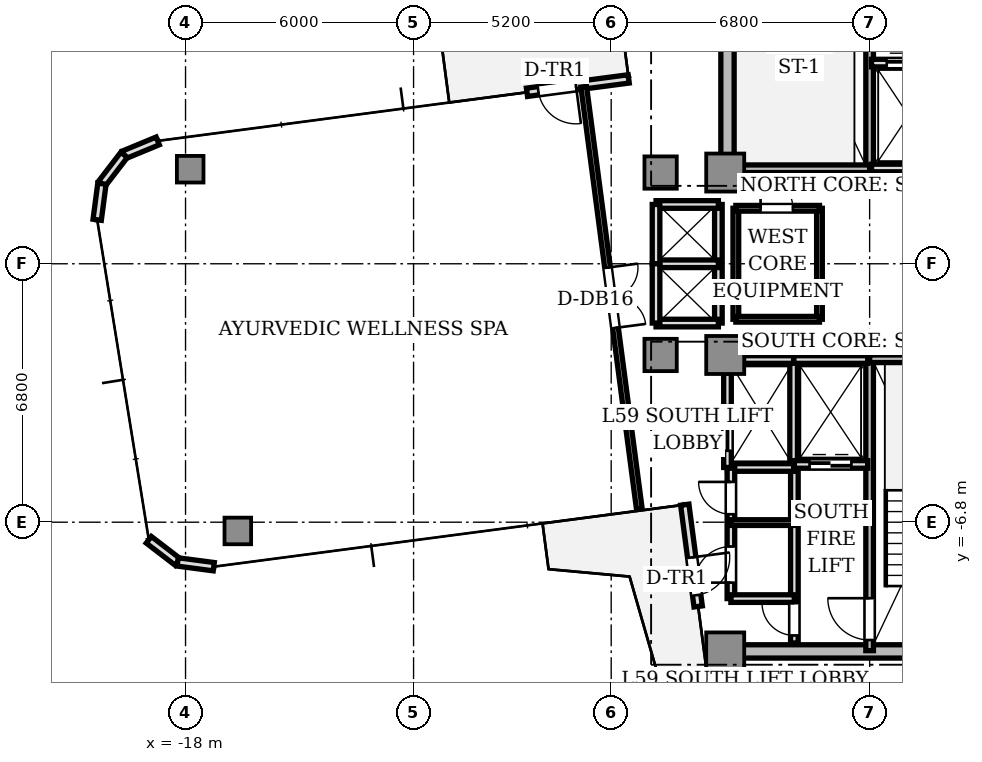
"""IFC4 building model, lengths in metres.
Left out: names, types, materials, properties, quantities, classifications, styles, units other than length and angle.
Written with IfcOpenShell. Run it as: python <this file> out.ifc"""

import sys

from ifc_helpers import new_model, si_unit, direction, frame, frame_2d, origin, origin_2d, place, context, subcontext, project, spatial, rectangle, extrude, source, transform, mapped, element, fill, save


model = new_model("IFC4")
c1 = context("Model", 3, precision=1e-05, world=origin(), true_north=direction((0.0, 1.0)))
c2 = subcontext(c1, "Body", "Model", "MODEL_VIEW")
j1 = project(units=[si_unit("LENGTHUNIT", "METRE"), si_unit("PLANEANGLEUNIT", "RADIAN")], contexts=[c1])
p1 = place(None, origin())
s1 = spatial("IfcSite", under=j1, at=p1, CompositionType="ELEMENT")
p2 = place(p1, origin())
s2 = spatial("IfcBuilding", under=s1, at=p2, CompositionType="ELEMENT")
p3 = place(p2, frame((0.0, 0.0, 213.2)))
s3 = spatial("IfcBuildingStorey", under=s2, at=p3, CompositionType="ELEMENT", Elevation=213.2)
p4 = place(p3, frame((-3.74, 2.85, 0.0), z_axis=(0.0, 0.0, 1.0), x_axis=(0.0, 1.0, 0.0)))
e1 = element("IfcWall", 1, at=p4, inside=s3, PredefinedType="SHEAR", context=c2, shape_type="SweptSolid", body=[
    extrude(rectangle(XDim=6.9, YDim=0.35, at=frame_2d((3.45, 0.0))), origin(), (0.0, 0.0, 1.0), 3.11),
])
p5 = place(p3, frame((-3.55, -10.2, 0.0), z_axis=(0.0, 0.0, 1.0), x_axis=(1.0, 0.0, 0.0)))
e2 = element("IfcWall", 2, at=p5, inside=s3, PredefinedType="SHEAR", context=c2, shape_type="SweptSolid", body=[
    extrude(rectangle(XDim=7.1, YDim=0.35, at=frame_2d((3.55, 0.0))), origin(), (0.0, 0.0, 1.0), 3.11),
])
m1 = source(origin(), c2, "Body", "SweptSolid", [
    extrude(rectangle(XDim=1.0, YDim=1.0, at=origin_2d()), origin(), (0.0, 0.0, 1.0), 3.11),
])
for number, where, z_axis, x_axis in (
    (3, (-3.8, 2.4, 0.0), (0.0, 0.0, 1.0), (1.0, 0.0, 0.0)),
    (4, (-3.8, -2.4, 0.0), (0.0, 0.0, 1.0), (1.0, 0.0, 0.0)),
    (5, (-3.8, -10.2, 0.0), (0.0, 0.0, 1.0), (1.0, 0.0, 0.0)),
):
    element("IfcColumn", number, at=place(p3, frame(where, z_axis=z_axis, x_axis=x_axis)), inside=s3, PredefinedType="COLUMN", context=c2, shape_type="MappedRepresentation", body=[
        mapped(m1, transform((0.0, 0.0, 0.0), scale=1.0)),
    ])
m2 = source(origin(), c2, "Body", "SweptSolid", [
    extrude(rectangle(XDim=0.85, YDim=0.85, at=origin_2d()), origin(), (0.0, 0.0, 1.0), 3.11),
])
for number, where, z_axis, x_axis in (
    (6, (-5.5, 2.4, 0.0), (0.0, 0.0, 1.0), (1.0, 0.0, 0.0)),
    (7, (-5.5, -2.4, 0.0), (0.0, 0.0, 1.0), (1.0, 0.0, 0.0)),
):
    element("IfcColumn", number, at=place(p3, frame(where, z_axis=z_axis, x_axis=x_axis)), inside=s3, PredefinedType="COLUMN", context=c2, shape_type="MappedRepresentation", body=[
        mapped(m2, transform((0.0, 0.0, 0.0), scale=1.0)),
    ])
m3 = source(origin(), c2, "Body", "SweptSolid", [
    extrude(rectangle(XDim=0.7, YDim=0.7, at=origin_2d()), origin(), (0.0, 0.0, 1.0), 3.11),
])
for number, where, z_axis, x_axis in (
    (8, (-17.878, 2.488, 0.0), (0.0, 0.0, 1.0), (1.0, 0.0, 0.0)),
    (9, (-16.625, -7.03, 0.0), (0.0, 0.0, 1.0), (1.0, 0.0, 0.0)),
):
    element("IfcColumn", number, at=place(p3, frame(where, z_axis=z_axis, x_axis=x_axis)), inside=s3, PredefinedType="COLUMN", context=c2, shape_type="MappedRepresentation", body=[
        mapped(m3, transform((0.0, 0.0, 0.0), scale=1.0)),
    ])
p6 = place(p3, frame((-6.339, 4.864, 0.0), z_axis=(0.0, 0.0, 1.0), x_axis=(-0.991439824936, -0.130564442062, 0.0)))
e10 = element("IfcWall", 10, at=p6, inside=s3, PredefinedType="STANDARD", context=c2, shape_type="SweptSolid", body=[
    extrude(rectangle(XDim=2.7, YDim=0.22, at=frame_2d((1.35, 0.0))), origin(), (0.0, 0.0, 1.0), 3.11),
])
p7 = place(p6, frame((1.4, 0.0, 0.0)))
e11 = element("IfcOpeningElement", 11, at=p7, cuts=e10, PredefinedType="OPENING", context=c2, shape_type="SweptSolid", body=[
    extrude(rectangle(XDim=1.0, YDim=2.2, at=frame_2d((0.5, 1.1))), frame((0.0, 0.12, 0.0), z_axis=(0.0, -1.0, 0.0), x_axis=(1.0, 0.0, 0.0)), (0.0, 0.0, 1.0), 0.24),
])
for number, where, z_axis, x_axis in (
    (12, (-18.732, 3.233, 0.0), (0.0, 0.0, 1.0), (-0.924, -0.383, 0.0)),
    (13, (-19.617, 2.866, 0.0), (0.0, 0.0, 1.0), (-0.609, -0.793, 0.0)),
    (14, (-20.2, 2.106, 0.0), (0.0, 0.0, 1.0), (-0.131, -0.991, 0.0)),
):
    element("IfcWall", number, at=place(p3, frame(where, z_axis=z_axis, x_axis=x_axis)), inside=s3, PredefinedType="STANDARD", context=c2, shape_type="SweptSolid", body=[
        extrude(rectangle(XDim=0.958, YDim=0.22, at=frame_2d((0.479, 0.0))), origin(), (0.0, 0.0, 1.0), 3.11),
    ])
p8 = place(p3, frame((-18.966, -7.263, 0.0), z_axis=(0.0, 0.0, 1.0), x_axis=(0.793249178392, -0.608897151398, 0.0)))
e15 = element("IfcWall", 15, at=p8, inside=s3, PredefinedType="STANDARD", context=c2, shape_type="SweptSolid", body=[
    extrude(rectangle(XDim=0.958, YDim=0.22, at=frame_2d((0.479, 0.0))), origin(), (0.0, 0.0, 1.0), 3.11),
])
p9 = place(p3, frame((-18.207, -7.846, 0.0), z_axis=(0.0, 0.0, 1.0), x_axis=(0.991444747987, -0.130527053476, 0.0)))
e16 = element("IfcWall", 16, at=p9, inside=s3, PredefinedType="STANDARD", context=c2, shape_type="SweptSolid", body=[
    extrude(rectangle(XDim=0.958, YDim=0.22, at=frame_2d((0.479, 0.0))), origin(), (0.0, 0.0, 1.0), 3.11),
])
p10 = place(p3, frame((-4.864, -6.339, 0.0), z_axis=(0.0, 0.0, 1.0), x_axis=(0.130564442062, -0.991439824936, 0.0)))
e17 = element("IfcWall", 17, at=p10, inside=s3, PredefinedType="STANDARD", context=c2, shape_type="SweptSolid", body=[
    extrude(rectangle(XDim=2.7, YDim=0.22, at=frame_2d((1.35, 0.0))), origin(), (0.0, 0.0, 1.0), 3.11),
])
p11 = place(p10, frame((1.4, 0.0, 0.0)))
e18 = element("IfcOpeningElement", 18, at=p11, cuts=e17, PredefinedType="OPENING", context=c2, shape_type="SweptSolid", body=[
    extrude(rectangle(XDim=1.0, YDim=2.2, at=frame_2d((0.5, 1.1))), frame((0.0, 0.12, 0.0), z_axis=(0.0, -1.0, 0.0), x_axis=(1.0, 0.0, 0.0)), (0.0, 0.0, 1.0), 0.24),
])
p12 = place(p3, frame((0.0, 2.5, 0.0), z_axis=(0.0, 0.0, 1.0), x_axis=(0.0, 1.0, 0.0)))
e19 = element("IfcWall", 19, at=p12, inside=s3, PredefinedType="SOLIDWALL", context=c2, shape_type="SweptSolid", body=[
    extrude(rectangle(XDim=7.68, YDim=0.2, at=frame_2d((3.84, 0.0))), origin(), (0.0, 0.0, 1.0), 3.11),
])
p13 = place(p12, frame((6.36, 0.0, 0.0)))
e20 = element("IfcOpeningElement", 20, at=p13, cuts=e19, PredefinedType="OPENING", context=c2, shape_type="SweptSolid", body=[
    extrude(rectangle(XDim=1.1, YDim=2.15, at=frame_2d((0.55, 1.075))), frame((0.0, 0.11, 0.0), z_axis=(0.0, -1.0, 0.0), x_axis=(1.0, 0.0, 0.0)), (0.0, 0.0, 1.0), 0.22),
])
p14 = place(p3, frame((-3.72, 2.5, 0.0), z_axis=(0.0, 0.0, 1.0), x_axis=(1.0, 0.0, 0.0)))
e21 = element("IfcWall", 21, at=p14, inside=s3, PredefinedType="SOLIDWALL", context=c2, shape_type="SweptSolid", body=[
    extrude(rectangle(XDim=3.72, YDim=0.2, at=frame_2d((1.86, 0.0))), origin(), (0.0, 0.0, 1.0), 3.11),
])
p15 = place(p3, frame((0.0, -10.18, 0.0), z_axis=(0.0, 0.0, 1.0), x_axis=(0.0, 1.0, 0.0)))
e22 = element("IfcWall", 22, at=p15, inside=s3, PredefinedType="SOLIDWALL", context=c2, shape_type="SweptSolid", body=[
    extrude(rectangle(XDim=7.68, YDim=0.2, at=frame_2d((3.84, 0.0))), origin(), (0.0, 0.0, 1.0), 3.11),
])
p16 = place(p15, frame((0.28, 0.0, 0.0)))
e23 = element("IfcOpeningElement", 23, at=p16, cuts=e22, PredefinedType="OPENING", context=c2, shape_type="SweptSolid", body=[
    extrude(rectangle(XDim=1.1, YDim=2.15, at=frame_2d((0.55, 1.075))), frame((0.0, 0.11, 0.0), z_axis=(0.0, -1.0, 0.0), x_axis=(1.0, 0.0, 0.0)), (0.0, 0.0, 1.0), 0.22),
])
p17 = place(p3, frame((0.0, -2.5, 0.0), z_axis=(0.0, 0.0, 1.0), x_axis=(1.0, 0.0, 0.0)))
e24 = element("IfcWall", 24, at=p17, inside=s3, PredefinedType="SOLIDWALL", context=c2, shape_type="SweptSolid", body=[
    extrude(rectangle(XDim=3.72, YDim=0.2, at=frame_2d((1.86, 0.0))), origin(), (0.0, 0.0, 1.0), 3.11),
])
p18 = place(p3, frame((-1.98, -9.98, 0.0), z_axis=(0.0, 0.0, 1.0), x_axis=(0.0, 1.0, 0.0)))
e25 = element("IfcWall", 25, at=p18, inside=s3, PredefinedType="SOLIDWALL", context=c2, shape_type="SweptSolid", body=[
    extrude(rectangle(XDim=4.66, YDim=0.2, at=frame_2d((2.33, 0.0))), origin(), (0.0, 0.0, 1.0), 2.66),
])
p19 = place(p18, frame((0.2, 0.0, 0.0)))
e26 = element("IfcOpeningElement", 26, at=p19, cuts=e25, PredefinedType="OPENING", context=c2, shape_type="SweptSolid", body=[
    extrude(rectangle(XDim=0.85, YDim=2.1, at=frame_2d((0.425, 1.05))), frame((0.0, 0.11, 0.0), z_axis=(0.0, -1.0, 0.0), x_axis=(1.0, 0.0, 0.0)), (0.0, 0.0, 1.0), 0.22),
])
p20 = place(p3, frame((0.05, 2.52, 0.0), z_axis=(0.0, 0.0, 1.0), x_axis=(1.0, 0.0, 0.0)))
e27 = element("IfcWall", 27, at=p20, inside=s3, PredefinedType="SOLIDWALL", context=c2, shape_type="SweptSolid", body=[
    extrude(rectangle(XDim=1.95, YDim=0.2, at=frame_2d((0.975, 0.0))), origin(), (0.0, 0.0, 1.0), 2.66),
])
p21 = place(p3, frame((0.05, 5.28, 0.0), z_axis=(0.0, 0.0, 1.0), x_axis=(1.0, 0.0, 0.0)))
e28 = element("IfcWall", 28, at=p21, inside=s3, PredefinedType="SOLIDWALL", context=c2, shape_type="SweptSolid", body=[
    extrude(rectangle(XDim=1.93, YDim=0.2, at=frame_2d((0.965, 0.0))), origin(), (0.0, 0.0, 1.0), 2.66),
])
p22 = place(p21, frame((0.4, 0.0, 0.0)))
e29 = element("IfcOpeningElement", 29, at=p22, cuts=e28, PredefinedType="OPENING", context=c2, shape_type="SweptSolid", body=[
    extrude(rectangle(XDim=1.1, YDim=2.2, at=frame_2d((0.55, 1.1))), frame((0.0, 0.11, 0.0), z_axis=(0.0, -1.0, 0.0), x_axis=(1.0, 0.0, 0.0)), (0.0, 0.0, 1.0), 0.22),
])
p23 = place(p3, frame((-2.0, -5.28, 0.0), z_axis=(0.0, 0.0, 1.0), x_axis=(0.0, 1.0, 0.0)))
e30 = element("IfcWall", 30, at=p23, inside=s3, PredefinedType="SOLIDWALL", context=c2, shape_type="SweptSolid", body=[
    extrude(rectangle(XDim=2.78, YDim=0.2, at=frame_2d((1.39, 0.0))), origin(), (0.0, 0.0, 1.0), 2.66),
])
p24 = place(p3, frame((-2.0, -2.52, 0.0), z_axis=(0.0, 0.0, 1.0), x_axis=(1.0, 0.0, 0.0)))
e31 = element("IfcWall", 31, at=p24, inside=s3, PredefinedType="SOLIDWALL", context=c2, shape_type="SweptSolid", body=[
    extrude(rectangle(XDim=1.95, YDim=0.2, at=frame_2d((0.975, 0.0))), origin(), (0.0, 0.0, 1.0), 2.66),
])
p25 = place(p3, frame((-1.98, -5.28, 0.0), z_axis=(0.0, 0.0, 1.0), x_axis=(1.0, 0.0, 0.0)))
e32 = element("IfcWall", 32, at=p25, inside=s3, PredefinedType="SOLIDWALL", context=c2, shape_type="SweptSolid", body=[
    extrude(rectangle(XDim=1.93, YDim=0.2, at=frame_2d((0.965, 0.0))), origin(), (0.0, 0.0, 1.0), 2.66),
])
p26 = place(p25, frame((0.4, 0.0, 0.0)))
e33 = element("IfcOpeningElement", 33, at=p26, cuts=e32, PredefinedType="OPENING", context=c2, shape_type="SweptSolid", body=[
    extrude(rectangle(XDim=1.1, YDim=2.2, at=frame_2d((0.55, 1.1))), frame((0.0, 0.11, 0.0), z_axis=(0.0, -1.0, 0.0), x_axis=(1.0, 0.0, 0.0)), (0.0, 0.0, 1.0), 0.22),
])
p27 = place(p3, frame((-3.32, -2.52, 0.0), z_axis=(0.0, 0.0, 1.0), x_axis=(1.0, 0.0, 0.0)))
e34 = element("IfcWall", 34, at=p27, inside=s3, PredefinedType="SOLIDWALL", context=c2, shape_type="SweptSolid", body=[
    extrude(rectangle(XDim=1.32, YDim=0.2, at=frame_2d((0.66, 0.0))), origin(), (0.0, 0.0, 1.0), 2.66),
])
p28 = place(p3, frame((-3.74, -5.36, 0.0), z_axis=(0.0, 0.0, 1.0), x_axis=(1.0, 0.0, 0.0)))
e35 = element("IfcWall", 35, at=p28, inside=s3, PredefinedType="SOLIDWALL", context=c2, shape_type="SweptSolid", body=[
    extrude(rectangle(XDim=1.74, YDim=0.2, at=frame_2d((0.87, 0.0))), origin(), (0.0, 0.0, 1.0), 2.66),
])
p29 = place(p3, frame((-3.74, -5.36, 0.0), z_axis=(0.0, 0.0, 1.0), x_axis=(0.0, 1.0, 0.0)))
e36 = element("IfcWall", 36, at=p29, inside=s3, PredefinedType="SOLIDWALL", context=c2, shape_type="SweptSolid", body=[
    extrude(rectangle(XDim=2.48, YDim=0.2, at=frame_2d((1.24, 0.0))), origin(), (0.0, 0.0, 1.0), 2.66),
])
p30 = place(p29, frame((0.44, 0.0, 0.0)))
e37 = element("IfcOpeningElement", 37, at=p30, cuts=e36, PredefinedType="OPENING", context=c2, shape_type="SweptSolid", body=[
    extrude(rectangle(XDim=1.2, YDim=2.2, at=frame_2d((0.6, 1.1))), frame((0.0, 0.11, 0.0), z_axis=(0.0, -1.0, 0.0), x_axis=(1.0, 0.0, 0.0)), (0.0, 0.0, 1.0), 0.22),
])
p31 = place(p3, frame((-3.98, -1.56, 0.0), z_axis=(0.0, 0.0, 1.0), x_axis=(0.0, 1.0, 0.0)))
e38 = element("IfcWall", 38, at=p31, inside=s3, PredefinedType="SOLIDWALL", context=c2, shape_type="SweptSolid", body=[
    extrude(rectangle(XDim=3.12, YDim=0.2, at=frame_2d((1.56, 0.0))), origin(), (0.0, 0.0, 1.0), 2.33),
])
for number, where, z_axis, x_axis in (
    (39, (-5.62, 1.56, 0.0), (0.0, 0.0, 1.0), (1.0, 0.0, 0.0)),
    (40, (-5.62, -1.56, 0.0), (0.0, 0.0, 1.0), (1.0, 0.0, 0.0)),
    (41, (-5.62, 0.0, 0.0), (0.0, 0.0, 1.0), (1.0, 0.0, 0.0)),
):
    element("IfcWall", number, at=place(p3, frame(where, z_axis=z_axis, x_axis=x_axis)), inside=s3, PredefinedType="SOLIDWALL", context=c2, shape_type="SweptSolid", body=[
        extrude(rectangle(XDim=1.64, YDim=0.2, at=frame_2d((0.82, 0.0))), origin(), (0.0, 0.0, 1.0), 2.66),
    ])
for number, where, z_axis, x_axis in (
    (42, (-5.62, 0.0, 0.0), (0.0, 0.0, 1.0), (0.0, 1.0, 0.0)),
    (43, (-5.62, -1.56, 0.0), (0.0, 0.0, 1.0), (0.0, 1.0, 0.0)),
):
    element("IfcWall", number, at=place(p3, frame(where, z_axis=z_axis, x_axis=x_axis)), inside=s3, PredefinedType="SOLIDWALL", context=c2, shape_type="SweptSolid", body=[
        extrude(rectangle(XDim=1.56, YDim=0.2, at=frame_2d((0.78, 0.0))), origin(), (0.0, 0.0, 1.0), 2.66),
    ])
p32 = place(p3, frame((-3.65, -8.81, 0.0), z_axis=(0.0, 0.0, 1.0), x_axis=(0.0, 1.0, 0.0)))
e44 = element("IfcWall", 44, at=p32, inside=s3, PredefinedType="SOLIDWALL", context=c2, shape_type="SweptSolid", body=[
    extrude(rectangle(XDim=3.43, YDim=0.2, at=frame_2d((1.715, 0.0))), origin(), (0.0, 0.0, 1.0), 2.66),
])
p33 = place(p32, frame((0.42, 0.0, 0.0)))
e45 = element("IfcOpeningElement", 45, at=p33, cuts=e44, PredefinedType="OPENING", context=c2, shape_type="SweptSolid", body=[
    extrude(rectangle(XDim=0.95, YDim=2.15, at=frame_2d((0.475, 1.075))), frame((0.0, 0.11, 0.0), z_axis=(0.0, -1.0, 0.0), x_axis=(1.0, 0.0, 0.0)), (0.0, 0.0, 1.0), 0.22),
])
p34 = place(p32, frame((2.22, 0.0, 0.0)))
e46 = element("IfcOpeningElement", 46, at=p34, cuts=e44, PredefinedType="OPENING", context=c2, shape_type="SweptSolid", body=[
    extrude(rectangle(XDim=0.85, YDim=2.1, at=frame_2d((0.425, 1.05))), frame((0.0, 0.11, 0.0), z_axis=(0.0, -1.0, 0.0), x_axis=(1.0, 0.0, 0.0)), (0.0, 0.0, 1.0), 0.22),
])
p35 = place(p3, frame((-3.65, -8.81, 0.0), z_axis=(0.0, 0.0, 1.0), x_axis=(1.0, 0.0, 0.0)))
e47 = element("IfcWall", 47, at=p35, inside=s3, PredefinedType="SOLIDWALL", context=c2, shape_type="SweptSolid", body=[
    extrude(rectangle(XDim=1.67, YDim=0.2, at=frame_2d((0.835, 0.0))), origin(), (0.0, 0.0, 1.0), 2.66),
])
p36 = place(p3, frame((-3.65, -6.81, 0.0), z_axis=(0.0, 0.0, 1.0), x_axis=(1.0, 0.0, 0.0)))
e48 = element("IfcWall", 48, at=p36, inside=s3, PredefinedType="PARTITIONING", context=c2, shape_type="SweptSolid", body=[
    extrude(rectangle(XDim=1.67, YDim=0.15, at=frame_2d((0.835, 0.0))), origin(), (0.0, 0.0, 1.0), 2.66),
])
p37 = place(p3, frame((-1.32, -1.46, 0.0), z_axis=(0.0, 0.0, 1.0), x_axis=(0.0, 1.0, 0.0)))
e49 = element("IfcWall", 49, at=p37, inside=s3, PredefinedType="PARTITIONING", context=c2, shape_type="SweptSolid", body=[
    extrude(rectangle(XDim=2.92, YDim=0.15, at=frame_2d((1.46, 0.0))), origin(), (0.0, 0.0, 1.0), 2.66),
])
p38 = place(p3, frame((-3.52, -1.46, 0.0), z_axis=(0.0, 0.0, 1.0), x_axis=(0.0, 1.0, 0.0)))
e50 = element("IfcWall", 50, at=p38, inside=s3, PredefinedType="PARTITIONING", context=c2, shape_type="SweptSolid", body=[
    extrude(rectangle(XDim=2.92, YDim=0.15, at=frame_2d((1.46, 0.0))), origin(), (0.0, 0.0, 1.0), 2.33),
])
p39 = place(p3, frame((-3.52, 1.46, 0.0), z_axis=(0.0, 0.0, 1.0), x_axis=(1.0, 0.0, 0.0)))
e51 = element("IfcWall", 51, at=p39, inside=s3, PredefinedType="PARTITIONING", context=c2, shape_type="SweptSolid", body=[
    extrude(rectangle(XDim=2.2, YDim=0.15, at=frame_2d((1.1, 0.0))), origin(), (0.0, 0.0, 1.0), 2.66),
])
p40 = place(p39, frame((0.65, 0.0, 0.0)))
e52 = element("IfcOpeningElement", 52, at=p40, cuts=e51, PredefinedType="OPENING", context=c2, shape_type="SweptSolid", body=[
    extrude(rectangle(XDim=0.85, YDim=2.1, at=frame_2d((0.425, 1.05))), frame((0.0, 0.085, 0.0), z_axis=(0.0, -1.0, 0.0), x_axis=(1.0, 0.0, 0.0)), (0.0, 0.0, 1.0), 0.17),
])
p41 = place(p3, frame((-3.52, -1.46, 0.0), z_axis=(0.0, 0.0, 1.0), x_axis=(1.0, 0.0, 0.0)))
e53 = element("IfcWall", 53, at=p41, inside=s3, PredefinedType="PARTITIONING", context=c2, shape_type="SweptSolid", body=[
    extrude(rectangle(XDim=2.2, YDim=0.15, at=frame_2d((1.1, 0.0))), origin(), (0.0, 0.0, 1.0), 2.66),
])
p42 = place(p3, frame((-7.522, 4.658, 0.0), z_axis=(0.0, 0.0, 1.0), x_axis=(0.130505824974, -0.99144754256, 0.0)))
e54 = element("IfcWall", 54, at=p42, inside=s3, PredefinedType="PARTITIONING", context=c2, shape_type="SweptSolid", body=[
    extrude(rectangle(XDim=11.2, YDim=0.15, at=frame_2d((5.6, 0.0))), origin(), (0.0, 0.0, 1.0), 2.66),
])
p43 = place(p42, frame((4.8, 0.0, 0.0)))
e55 = element("IfcOpeningElement", 55, at=p43, cuts=e54, PredefinedType="OPENING", context=c2, shape_type="SweptSolid", body=[
    extrude(rectangle(XDim=1.6, YDim=2.25, at=frame_2d((0.8, 1.125))), frame((0.0, 0.085, 0.0), z_axis=(0.0, -1.0, 0.0), x_axis=(1.0, 0.0, 0.0)), (0.0, 0.0, 1.0), 0.17),
])
m4 = source(origin(), c2, "Body", "SweptSolid", [
    extrude(rectangle(XDim=1.0, YDim=0.05, at=origin_2d()), origin(), (0.0, 0.0, 1.0), 2.2),
])
p44 = place(p7, frame((0.5, 0.0, 0.0)))
e56 = element("IfcDoor", 56, at=p44, inside=s3, OperationType="SINGLE_SWING_LEFT", PredefinedType="DOOR", context=c2, shape_type="MappedRepresentation", body=[
    mapped(m4, transform((0.0, 0.0, 0.0), scale=1.0)),
])
fill(e11, e56)
p45 = place(p11, frame((0.5, 0.0, 0.0)))
e57 = element("IfcDoor", 57, at=p45, inside=s3, OperationType="SINGLE_SWING_LEFT", PredefinedType="DOOR", context=c2, shape_type="MappedRepresentation", body=[
    mapped(m4, transform((0.0, 0.0, 0.0), scale=1.0)),
])
fill(e18, e57)
m5 = source(origin(), c2, "Body", "SweptSolid", [
    extrude(rectangle(XDim=1.1, YDim=0.05, at=origin_2d()), origin(), (0.0, 0.0, 1.0), 2.15),
])
p46 = place(p16, frame((0.55, 0.0, 0.0)))
e58 = element("IfcDoor", 58, at=p46, inside=s3, OperationType="SINGLE_SWING_RIGHT", PredefinedType="DOOR", context=c2, shape_type="MappedRepresentation", body=[
    mapped(m5, transform((0.0, 0.0, 0.0), scale=1.0)),
])
fill(e23, e58)
m6 = source(origin(), c2, "Body", "SweptSolid", [
    extrude(rectangle(XDim=0.85, YDim=0.05, at=origin_2d()), origin(), (0.0, 0.0, 1.0), 2.1),
])
p47 = place(p19, frame((0.425, 0.0, 0.0)))
e59 = element("IfcDoor", 59, at=p47, inside=s3, OperationType="SINGLE_SWING_RIGHT", PredefinedType="DOOR", context=c2, shape_type="MappedRepresentation", body=[
    mapped(m6, transform((0.0, 0.0, 0.0), scale=1.0)),
])
fill(e26, e59)
m7 = source(origin(), c2, "Body", "SweptSolid", [
    extrude(rectangle(XDim=1.1, YDim=0.05, at=origin_2d()), origin(), (0.0, 0.0, 1.0), 2.2),
])
p48 = place(p22, frame((0.55, 0.0, 0.0)))
e60 = element("IfcDoor", 60, at=p48, inside=s3, OperationType="DOUBLE_DOOR_SLIDING", PredefinedType="DOOR", context=c2, shape_type="MappedRepresentation", body=[
    mapped(m7, transform((0.0, 0.0, 0.0), scale=1.0)),
])
fill(e29, e60)
p49 = place(p26, frame((0.55, 0.0, 0.0)))
e61 = element("IfcDoor", 61, at=p49, inside=s3, OperationType="DOUBLE_DOOR_SLIDING", PredefinedType="DOOR", context=c2, shape_type="MappedRepresentation", body=[
    mapped(m7, transform((0.0, 0.0, 0.0), scale=1.0)),
])
fill(e33, e61)
m8 = source(origin(), c2, "Body", "SweptSolid", [
    extrude(rectangle(XDim=1.2, YDim=0.05, at=origin_2d()), origin(), (0.0, 0.0, 1.0), 2.2),
])
p50 = place(p30, frame((0.6, 0.0, 0.0)))
e62 = element("IfcDoor", 62, at=p50, inside=s3, OperationType="DOUBLE_DOOR_SLIDING", PredefinedType="DOOR", context=c2, shape_type="MappedRepresentation", body=[
    mapped(m8, transform((0.0, 0.0, 0.0), scale=1.0)),
])
fill(e37, e62)
m9 = source(origin(), c2, "Body", "SweptSolid", [
    extrude(rectangle(XDim=0.95, YDim=0.05, at=origin_2d()), origin(), (0.0, 0.0, 1.0), 2.15),
])
p51 = place(p33, frame((0.475, 0.0, 0.0)))
e63 = element("IfcDoor", 63, at=p51, inside=s3, OperationType="SINGLE_SWING_LEFT", PredefinedType="DOOR", context=c2, shape_type="MappedRepresentation", body=[
    mapped(m9, transform((0.0, 0.0, 0.0), scale=1.0)),
])
fill(e45, e63)
p52 = place(p34, frame((0.425, 0.0, 0.0)))
e64 = element("IfcDoor", 64, at=p52, inside=s3, OperationType="SINGLE_SWING_RIGHT", PredefinedType="DOOR", context=c2, shape_type="MappedRepresentation", body=[
    mapped(m6, transform((0.0, 0.0, 0.0), scale=1.0)),
])
fill(e46, e64)
p53 = place(p40, frame((0.425, 0.0, 0.0)))
e65 = element("IfcDoor", 65, at=p53, inside=s3, OperationType="SINGLE_SWING_LEFT", PredefinedType="DOOR", context=c2, shape_type="MappedRepresentation", body=[
    mapped(m6, transform((0.0, 0.0, 0.0), scale=1.0)),
])
fill(e52, e65)
m10 = source(origin(), c2, "Body", "SweptSolid", [
    extrude(rectangle(XDim=1.6, YDim=0.05, at=origin_2d()), origin(), (0.0, 0.0, 1.0), 2.25),
])
p54 = place(p43, frame((0.8, 0.0, 0.0)))
e66 = element("IfcDoor", 66, at=p54, inside=s3, OperationType="DOUBLE_DOOR_SINGLE_SWING", PredefinedType="DOOR", context=c2, shape_type="MappedRepresentation", body=[
    mapped(m10, transform((0.0, 0.0, 0.0), scale=1.0)),
])
fill(e55, e66)
save(model, sys.argv[1])
